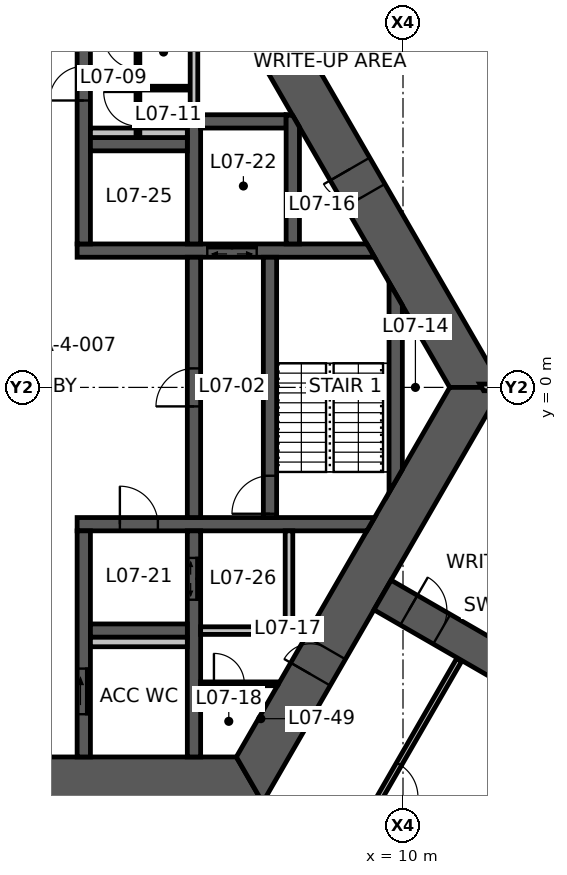
"""IFC4 building model, lengths in metres.
Left out: names, types, materials, properties, quantities, classifications, styles, units other than length and angle.
Written with IfcOpenShell. Run it as: python <this file> out.ifc"""

import sys

from ifc_helpers import new_model, si_unit, direction, frame, frame_2d, origin, place, context, subcontext, project, spatial, polyline, rectangle, outline, extrude, element, fill, save


model = new_model("IFC4")
c1 = context("Model", 3, precision=1e-05, world=origin(), true_north=direction((0.0, 1.0)))
c2 = subcontext(c1, "Body", "Model", "MODEL_VIEW")
j1 = project(units=[si_unit("LENGTHUNIT", "METRE"), si_unit("PLANEANGLEUNIT", "RADIAN")], contexts=[c1])
p1 = place(None, origin())
s1 = spatial("IfcSite", under=j1, at=p1, CompositionType="ELEMENT")
p2 = place(p1, origin())
s2 = spatial("IfcBuilding", under=s1, at=p2, CompositionType="ELEMENT")
p3 = place(p2, frame((0.0, 0.0, 26.8)))
s3 = spatial("IfcBuildingStorey", under=s2, at=p3, CompositionType="ELEMENT", Elevation=26.8)
p4 = place(p3, frame((11.922, 0.0, 0.0), z_axis=(0.0, 0.0, 1.0), x_axis=(-0.500004296715, 0.866022923061, 0.0)))
e1 = element("IfcWall", 1, at=p4, inside=s3, PredefinedType="SHEAR", context=c2, shape_type="SweptSolid", body=[
    extrude(outline(polyline([(-0.346, -0.6), (5.835, -0.6), (6.635, -0.6), (12.269, -0.6), (11.576, 0.6), (6.635, 0.6), (5.835, 0.6), (0.346, 0.6), (-0.346, -0.6)])), origin(), (0.0, 0.0, 1.0), 4.2),
])
p5 = place(p4, frame((5.835, 0.0, 0.0)))
e2 = element("IfcOpeningElement", 2, at=p5, cuts=e1, PredefinedType="OPENING", context=c2, shape_type="SweptSolid", body=[
    extrude(rectangle(XDim=0.8, YDim=2.1, at=frame_2d((0.4, 1.05))), frame((0.0, 0.61, 0.0), z_axis=(0.0, -1.0, 0.0), x_axis=(1.0, 0.0, 0.0)), (0.0, 0.0, 1.0), 1.22),
])
p6 = place(p3, frame((-5.961, -10.325, 0.0), z_axis=(0.0, 0.0, 1.0), x_axis=(1.0, 0.0, 0.0)))
e3 = element("IfcWall", 3, at=p6, inside=s3, PredefinedType="SHEAR", context=c2, shape_type="SweptSolid", body=[
    extrude(outline(polyline([(-0.346, -0.6), (5.461, -0.6), (6.461, -0.6), (12.269, -0.6), (11.576, 0.6), (6.461, 0.6), (5.461, 0.6), (0.346, 0.6), (-0.346, -0.6)])), origin(), (0.0, 0.0, 1.0), 4.2),
])
p7 = place(p6, frame((5.461, 0.0, 0.0)))
e4 = element("IfcOpeningElement", 4, at=p7, cuts=e3, PredefinedType="OPENING", context=c2, shape_type="SweptSolid", body=[
    extrude(rectangle(XDim=1.0, YDim=2.1, at=frame_2d((0.5, 1.05))), frame((0.0, 0.61, 0.0), z_axis=(0.0, -1.0, 0.0), x_axis=(1.0, 0.0, 0.0)), (0.0, 0.0, 1.0), 1.22),
])
p8 = place(p3, frame((5.961, -10.325, 0.0), z_axis=(0.0, 0.0, 1.0), x_axis=(0.500004296715, 0.866022923061, 0.0)))
e5 = element("IfcWall", 5, at=p8, inside=s3, PredefinedType="SHEAR", context=c2, shape_type="SweptSolid", body=[
    extrude(outline(polyline([(-0.346, -0.6), (3.208, -0.6), (4.009, -0.6), (12.269, -0.6), (11.576, 0.6), (4.009, 0.6), (3.208, 0.6), (0.346, 0.6), (-0.346, -0.6)])), origin(), (0.0, 0.0, 1.0), 4.2),
])
p9 = place(p8, frame((3.208, 0.0, 0.0)))
e6 = element("IfcOpeningElement", 6, at=p9, cuts=e5, PredefinedType="OPENING", context=c2, shape_type="SweptSolid", body=[
    extrude(rectangle(XDim=0.8, YDim=2.1, at=frame_2d((0.4, 1.05))), frame((0.0, 0.61, 0.0), z_axis=(0.0, -1.0, 0.0), x_axis=(1.0, 0.0, 0.0)), (0.0, 0.0, 1.0), 1.22),
])
p10 = place(p3, frame((9.461, -5.462, 0.0), z_axis=(0.0, 0.0, 1.0), x_axis=(0.866019116917, -0.500010889016, 0.0)))
e7 = element("IfcWall", 7, at=p10, inside=s3, PredefinedType="SHEAR", context=c2, shape_type="SweptSolid", body=[
    extrude(rectangle(XDim=7.595, YDim=0.9, at=frame_2d((3.798, 0.0))), origin(), (0.0, 0.0, 1.0), 4.2),
])
p11 = place(p10, frame((0.8, 0.0, 0.0)))
e8 = element("IfcOpeningElement", 8, at=p11, cuts=e7, PredefinedType="OPENING", context=c2, shape_type="SweptSolid", body=[
    extrude(rectangle(XDim=1.0, YDim=2.1, at=frame_2d((0.5, 1.05))), frame((0.0, 0.46, 0.0), z_axis=(0.0, -1.0, 0.0), x_axis=(1.0, 0.0, 0.0)), (0.0, 0.0, 1.0), 0.92),
])
p12 = place(p3, frame((1.425, 3.6, 0.0), z_axis=(0.0, 0.0, 1.0), x_axis=(1.0, 0.0, 0.0)))
e9 = element("IfcWall", 9, at=p12, inside=s3, PredefinedType="SHEAR", context=c2, shape_type="SweptSolid", body=[
    extrude(outline(polyline([(0.0, -0.175), (3.425, -0.175), (4.725, -0.175), (7.827, -0.175), (7.625, 0.175), (4.725, 0.175), (3.425, 0.175), (0.0, 0.175), (0.0, -0.175)])), origin(), (0.0, 0.0, 1.0), 4.2),
])
p13 = place(p12, frame((3.425, 0.0, 0.0)))
e10 = element("IfcOpeningElement", 10, at=p13, cuts=e9, PredefinedType="OPENING", context=c2, shape_type="SweptSolid", body=[
    extrude(rectangle(XDim=1.3, YDim=2.1, at=frame_2d((0.65, 1.05))), frame((0.0, 0.185, 0.0), z_axis=(0.0, -1.0, 0.0), x_axis=(1.0, 0.0, 0.0)), (0.0, 0.0, 1.0), 0.37),
])
p14 = place(p3, frame((1.425, -3.6, 0.0), z_axis=(0.0, 0.0, 1.0), x_axis=(1.0, 0.0, 0.0)))
e11 = element("IfcWall", 11, at=p14, inside=s3, PredefinedType="SHEAR", context=c2, shape_type="SweptSolid", body=[
    extrude(outline(polyline([(0.0, -0.175), (1.125, -0.175), (2.125, -0.175), (7.625, -0.175), (7.827, 0.175), (2.125, 0.175), (1.125, 0.175), (0.0, 0.175), (0.0, -0.175)])), origin(), (0.0, 0.0, 1.0), 4.2),
])
p15 = place(p14, frame((1.125, 0.0, 0.0)))
e12 = element("IfcOpeningElement", 12, at=p15, cuts=e11, PredefinedType="OPENING", context=c2, shape_type="SweptSolid", body=[
    extrude(rectangle(XDim=1.0, YDim=2.1, at=frame_2d((0.5, 1.05))), frame((0.0, 0.185, 0.0), z_axis=(0.0, -1.0, 0.0), x_axis=(1.0, 0.0, 0.0)), (0.0, 0.0, 1.0), 0.37),
])
p16 = place(p3, frame((1.6, 3.775, 0.0), z_axis=(0.0, 0.0, 1.0), x_axis=(0.0, 1.0, 0.0)))
e13 = element("IfcWall", 13, at=p16, inside=s3, PredefinedType="SHEAR", context=c2, shape_type="SweptSolid", body=[
    extrude(rectangle(XDim=5.95, YDim=0.35, at=frame_2d((2.975, 0.0))), origin(), (0.0, 0.0, 1.0), 4.2),
])
p17 = place(p16, frame((3.775, 0.0, 0.0)))
e14 = element("IfcOpeningElement", 14, at=p17, cuts=e13, PredefinedType="OPENING", context=c2, shape_type="SweptSolid", body=[
    extrude(rectangle(XDim=0.9, YDim=2.1, at=frame_2d((0.45, 1.05))), frame((0.0, 0.185, 0.0), z_axis=(0.0, -1.0, 0.0), x_axis=(1.0, 0.0, 0.0)), (0.0, 0.0, 1.0), 0.37),
])
p18 = place(p3, frame((1.6, -3.775, 0.0), z_axis=(0.0, 0.0, 1.0), x_axis=(0.0, -1.0, 0.0)))
e15 = element("IfcWall", 15, at=p18, inside=s3, PredefinedType="SHEAR", context=c2, shape_type="SweptSolid", body=[
    extrude(rectangle(XDim=5.95, YDim=0.35, at=frame_2d((2.975, 0.0))), origin(), (0.0, 0.0, 1.0), 4.2),
])
p19 = place(p18, frame((3.625, 0.0, 0.0)))
e16 = element("IfcOpeningElement", 16, at=p19, cuts=e15, PredefinedType="OPENING", context=c2, shape_type="SweptSolid", body=[
    extrude(rectangle(XDim=1.2, YDim=2.1, at=frame_2d((0.6, 1.05))), frame((0.0, 0.185, 0.0), z_axis=(0.0, -1.0, 0.0), x_axis=(1.0, 0.0, 0.0)), (0.0, 0.0, 1.0), 0.37),
])
p20 = place(p3, frame((4.5, -3.425, 0.0), z_axis=(0.0, 0.0, 1.0), x_axis=(0.0, 1.0, 0.0)))
e17 = element("IfcWall", 17, at=p20, inside=s3, PredefinedType="SHEAR", context=c2, shape_type="SweptSolid", body=[
    extrude(rectangle(XDim=6.85, YDim=0.35, at=frame_2d((3.425, 0.0))), origin(), (0.0, 0.0, 1.0), 4.2),
])
p21 = place(p20, frame((2.925, 0.0, 0.0)))
e18 = element("IfcOpeningElement", 18, at=p21, cuts=e17, PredefinedType="OPENING", context=c2, shape_type="SweptSolid", body=[
    extrude(rectangle(XDim=1.0, YDim=2.1, at=frame_2d((0.5, 1.05))), frame((0.0, 0.185, 0.0), z_axis=(0.0, -1.0, 0.0), x_axis=(1.0, 0.0, 0.0)), (0.0, 0.0, 1.0), 0.37),
])
p22 = place(p3, frame((6.5, -3.425, 0.0), z_axis=(0.0, 0.0, 1.0), x_axis=(0.0, 1.0, 0.0)))
e19 = element("IfcWall", 19, at=p22, inside=s3, PredefinedType="SHEAR", context=c2, shape_type="SweptSolid", body=[
    extrude(rectangle(XDim=6.85, YDim=0.35, at=frame_2d((3.425, 0.0))), origin(), (0.0, 0.0, 1.0), 4.2),
])
p23 = place(p22, frame((0.1, 0.0, 0.0)))
e20 = element("IfcOpeningElement", 20, at=p23, cuts=e19, PredefinedType="OPENING", context=c2, shape_type="SweptSolid", body=[
    extrude(rectangle(XDim=1.0, YDim=2.1, at=frame_2d((0.5, 1.05))), frame((0.0, 0.185, 0.0), z_axis=(0.0, -1.0, 0.0), x_axis=(1.0, 0.0, 0.0)), (0.0, 0.0, 1.0), 0.37),
])
p24 = place(p3, frame((4.5, 3.775, 0.0), z_axis=(0.0, 0.0, 1.0), x_axis=(0.0, 1.0, 0.0)))
e21 = element("IfcWall", 21, at=p24, inside=s3, PredefinedType="SHEAR", context=c2, shape_type="SweptSolid", body=[
    extrude(rectangle(XDim=3.4, YDim=0.35, at=frame_2d((1.7, 0.0))), origin(), (0.0, 0.0, 1.0), 4.2),
])
p25 = place(p3, frame((4.5, -3.775, 0.0), z_axis=(0.0, 0.0, 1.0), x_axis=(0.0, -1.0, 0.0)))
e22 = element("IfcWall", 22, at=p25, inside=s3, PredefinedType="SHEAR", context=c2, shape_type="SweptSolid", body=[
    extrude(rectangle(XDim=5.95, YDim=0.35, at=frame_2d((2.975, 0.0))), origin(), (0.0, 0.0, 1.0), 4.2),
])
p26 = place(p25, frame((0.712, 0.0, 0.0)))
e23 = element("IfcOpeningElement", 23, at=p26, cuts=e22, PredefinedType="OPENING", context=c2, shape_type="SweptSolid", body=[
    extrude(rectangle(XDim=1.1, YDim=2.1, at=frame_2d((0.55, 1.05))), frame((0.0, 0.185, 0.0), z_axis=(0.0, -1.0, 0.0), x_axis=(1.0, 0.0, 0.0)), (0.0, 0.0, 1.0), 0.37),
])
for number, where, z_axis, x_axis in (
    (24, (1.775, 6.4, 0.0), (0.0, 0.0, 1.0), (1.0, 0.0, 0.0)),
    (25, (1.775, -6.4, 0.0), (0.0, 0.0, 1.0), (1.0, 0.0, 0.0)),
):
    element("IfcWall", number, at=place(p3, frame(where, z_axis=z_axis, x_axis=x_axis)), inside=s3, PredefinedType="SHEAR", context=c2, shape_type="SweptSolid", body=[
        extrude(rectangle(XDim=2.55, YDim=0.35, at=frame_2d((1.275, 0.0))), origin(), (0.0, 0.0, 1.0), 4.2),
    ])
p27 = place(p3, frame((4.675, 7.0, 0.0), z_axis=(0.0, 0.0, 1.0), x_axis=(1.0, 0.0, 0.0)))
e26 = element("IfcWall", 26, at=p27, inside=s3, PredefinedType="SHEAR", context=c2, shape_type="SweptSolid", body=[
    extrude(rectangle(XDim=2.25, YDim=0.35, at=frame_2d((1.125, 0.0))), origin(), (0.0, 0.0, 1.0), 4.2),
])
p28 = place(p3, frame((7.1, 3.775, 0.0), z_axis=(0.0, 0.0, 1.0), x_axis=(0.0, 1.0, 0.0)))
e27 = element("IfcWall", 27, at=p28, inside=s3, PredefinedType="SHEAR", context=c2, shape_type="SweptSolid", body=[
    extrude(outline(polyline([(0.0, -0.175), (3.074, -0.175), (3.377, 0.0), (3.4, 0.175), (0.0, 0.175), (0.0, -0.175)])), origin(), (0.0, 0.0, 1.0), 4.2),
])
p29 = place(p3, frame((9.808, -2.462, 0.0), z_axis=(0.0, 0.0, 1.0), x_axis=(0.0, 1.0, 0.0)))
e28 = element("IfcWall", 28, at=p29, inside=s3, PredefinedType="SHEAR", context=c2, shape_type="SweptSolid", body=[
    extrude(outline(polyline([(0.303, -0.175), (4.621, -0.175), (5.228, 0.175), (-0.303, 0.175), (0.303, -0.175)])), origin(), (0.0, 0.0, 1.0), 4.2),
])
p30 = place(p3, frame((4.5, 7.175, 0.0), z_axis=(0.0, 0.0, 1.0), x_axis=(0.0, 1.0, 0.0)))
e29 = element("IfcWall", 29, at=p30, inside=s3, PredefinedType="STANDARD", context=c2, shape_type="SweptSolid", body=[
    extrude(rectangle(XDim=2.55, YDim=0.2, at=frame_2d((1.275, 0.0))), origin(), (0.0, 0.0, 1.0), 4.2),
])
p31 = place(p3, frame((4.675, -6.4, 0.0), z_axis=(0.0, 0.0, 1.0), x_axis=(1.0, 0.0, 0.0)))
e30 = element("IfcWall", 30, at=p31, inside=s3, PredefinedType="STANDARD", context=c2, shape_type="SweptSolid", body=[
    extrude(rectangle(XDim=2.425, YDim=0.2, at=frame_2d((1.212, 0.0))), origin(), (0.0, 0.0, 1.0), 4.2),
])
p32 = place(p3, frame((7.0, -3.775, 0.0), z_axis=(0.0, 0.0, 1.0), x_axis=(0.0, -1.0, 0.0)))
e31 = element("IfcWall", 31, at=p32, inside=s3, PredefinedType="STANDARD", context=c2, shape_type="SweptSolid", body=[
    extrude(rectangle(XDim=2.525, YDim=0.2, at=frame_2d((1.263, 0.0))), origin(), (0.0, 0.0, 1.0), 4.2),
])
for number, where, z_axis, x_axis in (
    (32, (1.775, 6.7, 0.0), (0.0, 0.0, 1.0), (1.0, 0.0, 0.0)),
    (33, (1.775, -6.7, 0.0), (0.0, 0.0, 1.0), (1.0, 0.0, 0.0)),
):
    element("IfcWall", number, at=place(p3, frame(where, z_axis=z_axis, x_axis=x_axis)), inside=s3, PredefinedType="PLUMBINGWALL", context=c2, shape_type="SweptSolid", body=[
        extrude(rectangle(XDim=2.55, YDim=0.25, at=frame_2d((1.275, 0.0))), origin(), (0.0, 0.0, 1.0), 4.2),
    ])
p33 = place(p3, frame((3.025, 6.575, 0.0), z_axis=(0.0, 0.0, 1.0), x_axis=(0.0, 1.0, 0.0)))
e34 = element("IfcWall", 34, at=p33, inside=s3, PredefinedType="PARTITIONING", context=c2, shape_type="SweptSolid", body=[
    extrude(rectangle(XDim=3.15, YDim=0.1, at=frame_2d((1.575, 0.0))), origin(), (0.0, 0.0, 1.0), 3.23),
])
p34 = place(p33, frame((1.8, 0.0, 0.0)))
e35 = element("IfcOpeningElement", 35, at=p34, cuts=e34, PredefinedType="OPENING", context=c2, shape_type="SweptSolid", body=[
    extrude(rectangle(XDim=0.9, YDim=2.1, at=frame_2d((0.45, 1.05))), frame((0.0, 0.06, 0.0), z_axis=(0.0, -1.0, 0.0), x_axis=(1.0, 0.0, 0.0)), (0.0, 0.0, 1.0), 0.12),
])
p35 = place(p33, frame((0.3, 0.0, 0.0)))
e36 = element("IfcOpeningElement", 36, at=p35, cuts=e34, PredefinedType="OPENING", context=c2, shape_type="SweptSolid", body=[
    extrude(rectangle(XDim=0.9, YDim=2.1, at=frame_2d((0.45, 1.05))), frame((0.0, 0.06, 0.0), z_axis=(0.0, -1.0, 0.0), x_axis=(1.0, 0.0, 0.0)), (0.0, 0.0, 1.0), 0.12),
])
p36 = place(p3, frame((3.075, 7.875, 0.0), z_axis=(0.0, 0.0, 1.0), x_axis=(1.0, 0.0, 0.0)))
e37 = element("IfcWall", 37, at=p36, inside=s3, PredefinedType="PARTITIONING", context=c2, shape_type="SweptSolid", body=[
    extrude(rectangle(XDim=1.25, YDim=0.1, at=frame_2d((0.625, 0.0))), origin(), (0.0, 0.0, 1.0), 3.23),
])
p37 = place(p3, frame((4.675, -7.8, 0.0), z_axis=(0.0, 0.0, 1.0), x_axis=(1.0, 0.0, 0.0)))
e38 = element("IfcWall", 38, at=p37, inside=s3, PredefinedType="PARTITIONING", context=c2, shape_type="SweptSolid", body=[
    extrude(outline(polyline([(0.0, -0.05), (0.35, -0.05), (1.15, -0.05), (2.022, -0.05), (2.051, 0.0), (2.057, 0.05), (1.15, 0.05), (0.35, 0.05), (0.0, 0.05), (0.0, -0.05)])), origin(), (0.0, 0.0, 1.0), 3.23),
])
p38 = place(p37, frame((0.35, 0.0, 0.0)))
e39 = element("IfcOpeningElement", 39, at=p38, cuts=e38, PredefinedType="OPENING", context=c2, shape_type="SweptSolid", body=[
    extrude(rectangle(XDim=0.8, YDim=2.1, at=frame_2d((0.4, 1.05))), frame((0.0, 0.06, 0.0), z_axis=(0.0, -1.0, 0.0), x_axis=(1.0, 0.0, 0.0)), (0.0, 0.0, 1.0), 0.12),
])
p39 = place(p3, frame((12.07, 0.0, 0.0), z_axis=(0.0, 0.0, 1.0), x_axis=(1.0, 0.0, 0.0)))
e40 = element("IfcWall", 40, at=p39, inside=s3, PredefinedType="PARTITIONING", context=c2, shape_type="SweptSolid", body=[
    extrude(outline(polyline([(0.051, -0.087), (1.129, -0.087), (2.129, -0.087), (7.93, -0.087), (7.93, 0.087), (2.129, 0.087), (1.129, 0.087), (-0.051, 0.087), (0.051, -0.087)])), origin(), (0.0, 0.0, 1.0), 3.33),
])
p40 = place(p39, frame((1.129, 0.0, 0.0)))
e41 = element("IfcOpeningElement", 41, at=p40, cuts=e40, PredefinedType="OPENING", context=c2, shape_type="SweptSolid", body=[
    extrude(rectangle(XDim=1.0, YDim=2.1, at=frame_2d((0.5, 1.05))), frame((0.0, 0.098, 0.0), z_axis=(0.0, -1.0, 0.0), x_axis=(1.0, 0.0, 0.0)), (0.0, 0.0, 1.0), 0.195),
])
p41 = place(p3, frame((14.775, -9.05, 0.0), z_axis=(0.0, 0.0, 1.0), x_axis=(-0.499993908199, -0.866028920859, 0.0)))
e42 = element("IfcWall", 42, at=p41, inside=s3, PredefinedType="PARTITIONING", context=c2, shape_type="SweptSolid", body=[
    extrude(rectangle(XDim=9.55, YDim=0.175, at=frame_2d((4.775, 0.0))), origin(), (0.0, 0.0, 1.0), 3.238),
])
p42 = place(p41, frame((4.175, 0.0, 0.0)))
e43 = element("IfcOpeningElement", 43, at=p42, cuts=e42, PredefinedType="OPENING", context=c2, shape_type="SweptSolid", body=[
    extrude(rectangle(XDim=1.2, YDim=2.1, at=frame_2d((0.6, 1.05))), frame((0.0, 0.098, 0.0), z_axis=(0.0, -1.0, 0.0), x_axis=(1.0, 0.0, 0.0)), (0.0, 0.0, 1.0), 0.195),
])
p43 = place(p3, frame((11.478, -7.169, 0.0), z_axis=(0.0, 0.0, 1.0), x_axis=(-0.500010424145, -0.866019385318, 0.0)))
e44 = element("IfcWall", 44, at=p43, inside=s3, PredefinedType="PARTITIONING", context=c2, shape_type="SweptSolid", body=[
    extrude(rectangle(XDim=7.339, YDim=0.15, at=frame_2d((3.669, 0.0))), origin(), (0.0, 0.0, 1.0), 3.23),
])
p44 = place(p43, frame((3.169, 0.0, 0.0)))
e45 = element("IfcOpeningElement", 45, at=p44, cuts=e44, PredefinedType="OPENING", context=c2, shape_type="SweptSolid", body=[
    extrude(rectangle(XDim=1.0, YDim=2.1, at=frame_2d((0.5, 1.05))), frame((0.0, 0.085, 0.0), z_axis=(0.0, -1.0, 0.0), x_axis=(1.0, 0.0, 0.0)), (0.0, 0.0, 1.0), 0.17),
])
p45 = place(p5, origin())
e46 = element("IfcDoor", 46, at=p45, inside=s3, OperationType="SINGLE_SWING_RIGHT", PredefinedType="DOOR", context=c2, shape_type="SweptSolid", body=[
    extrude(rectangle(XDim=0.8, YDim=2.1, at=frame_2d((0.4, 1.05))), frame((0.0, 0.025, 0.0), z_axis=(0.0, -1.0, 0.0), x_axis=(1.0, 0.0, 0.0)), (0.0, 0.0, 1.0), 0.05),
])
fill(e2, e46)
p46 = place(p9, origin())
e47 = element("IfcDoor", 47, at=p46, inside=s3, OperationType="SINGLE_SWING_LEFT", PredefinedType="DOOR", context=c2, shape_type="SweptSolid", body=[
    extrude(rectangle(XDim=0.8, YDim=2.1, at=frame_2d((0.4, 1.05))), frame((0.0, 0.025, 0.0), z_axis=(0.0, -1.0, 0.0), x_axis=(1.0, 0.0, 0.0)), (0.0, 0.0, 1.0), 0.05),
])
fill(e6, e47)
p47 = place(p21, origin())
e48 = element("IfcDoor", 48, at=p47, inside=s3, OperationType="SINGLE_SWING_LEFT", PredefinedType="DOOR", context=c2, shape_type="SweptSolid", body=[
    extrude(rectangle(XDim=1.0, YDim=2.1, at=frame_2d((0.5, 1.05))), frame((0.0, 0.025, 0.0), z_axis=(0.0, -1.0, 0.0), x_axis=(1.0, 0.0, 0.0)), (0.0, 0.0, 1.0), 0.05),
])
fill(e18, e48)
p48 = place(p23, origin())
e49 = element("IfcDoor", 49, at=p48, inside=s3, OperationType="SINGLE_SWING_LEFT", PredefinedType="DOOR", context=c2, shape_type="SweptSolid", body=[
    extrude(rectangle(XDim=1.0, YDim=2.1, at=frame_2d((0.5, 1.05))), frame((0.0, 0.025, 0.0), z_axis=(0.0, -1.0, 0.0), x_axis=(1.0, 0.0, 0.0)), (0.0, 0.0, 1.0), 0.05),
])
fill(e20, e49)
p49 = place(p17, origin())
e50 = element("IfcDoor", 50, at=p49, inside=s3, OperationType="SINGLE_SWING_LEFT", PredefinedType="DOOR", context=c2, shape_type="SweptSolid", body=[
    extrude(rectangle(XDim=0.9, YDim=2.1, at=frame_2d((0.45, 1.05))), frame((0.0, 0.025, 0.0), z_axis=(0.0, -1.0, 0.0), x_axis=(1.0, 0.0, 0.0)), (0.0, 0.0, 1.0), 0.05),
])
fill(e14, e50)
p50 = place(p19, origin())
e51 = element("IfcDoor", 51, at=p50, inside=s3, OperationType="SLIDING_TO_LEFT", PredefinedType="DOOR", context=c2, shape_type="SweptSolid", body=[
    extrude(rectangle(XDim=1.2, YDim=2.1, at=frame_2d((0.6, 1.05))), frame((0.0, 0.025, 0.0), z_axis=(0.0, -1.0, 0.0), x_axis=(1.0, 0.0, 0.0)), (0.0, 0.0, 1.0), 0.05),
])
fill(e16, e51)
p51 = place(p15, origin())
e52 = element("IfcDoor", 52, at=p51, inside=s3, OperationType="SINGLE_SWING_LEFT", PredefinedType="DOOR", context=c2, shape_type="SweptSolid", body=[
    extrude(rectangle(XDim=1.0, YDim=2.1, at=frame_2d((0.5, 1.05))), frame((0.0, 0.025, 0.0), z_axis=(0.0, -1.0, 0.0), x_axis=(1.0, 0.0, 0.0)), (0.0, 0.0, 1.0), 0.05),
])
fill(e12, e52)
p52 = place(p11, origin())
e53 = element("IfcDoor", 53, at=p52, inside=s3, OperationType="SINGLE_SWING_LEFT", PredefinedType="DOOR", context=c2, shape_type="SweptSolid", body=[
    extrude(rectangle(XDim=1.0, YDim=2.1, at=frame_2d((0.5, 1.05))), frame((0.0, 0.025, 0.0), z_axis=(0.0, -1.0, 0.0), x_axis=(1.0, 0.0, 0.0)), (0.0, 0.0, 1.0), 0.05),
])
fill(e8, e53)
p53 = place(p34, origin())
e54 = element("IfcDoor", 54, at=p53, inside=s3, OperationType="SINGLE_SWING_RIGHT", PredefinedType="DOOR", context=c2, shape_type="SweptSolid", body=[
    extrude(rectangle(XDim=0.9, YDim=2.1, at=frame_2d((0.45, 1.05))), frame((0.0, 0.025, 0.0), z_axis=(0.0, -1.0, 0.0), x_axis=(1.0, 0.0, 0.0)), (0.0, 0.0, 1.0), 0.05),
])
fill(e35, e54)
p54 = place(p35, origin())
e55 = element("IfcDoor", 55, at=p54, inside=s3, OperationType="SINGLE_SWING_RIGHT", PredefinedType="DOOR", context=c2, shape_type="SweptSolid", body=[
    extrude(rectangle(XDim=0.9, YDim=2.1, at=frame_2d((0.45, 1.05))), frame((0.0, 0.025, 0.0), z_axis=(0.0, -1.0, 0.0), x_axis=(1.0, 0.0, 0.0)), (0.0, 0.0, 1.0), 0.05),
])
fill(e36, e55)
p55 = place(p38, origin())
e56 = element("IfcDoor", 56, at=p55, inside=s3, OperationType="SINGLE_SWING_LEFT", PredefinedType="DOOR", context=c2, shape_type="SweptSolid", body=[
    extrude(rectangle(XDim=0.8, YDim=2.1, at=frame_2d((0.4, 1.05))), frame((0.0, 0.025, 0.0), z_axis=(0.0, -1.0, 0.0), x_axis=(1.0, 0.0, 0.0)), (0.0, 0.0, 1.0), 0.05),
])
fill(e39, e56)
p56 = place(p44, origin())
e57 = element("IfcDoor", 57, at=p56, inside=s3, OperationType="SINGLE_SWING_RIGHT", PredefinedType="DOOR", context=c2, shape_type="SweptSolid", body=[
    extrude(rectangle(XDim=1.0, YDim=2.1, at=frame_2d((0.5, 1.05))), frame((0.0, 0.025, 0.0), z_axis=(0.0, -1.0, 0.0), x_axis=(1.0, 0.0, 0.0)), (0.0, 0.0, 1.0), 0.05),
])
fill(e45, e57)
p57 = place(p26, origin())
e58 = element("IfcDoor", 58, at=p57, inside=s3, OperationType="DOUBLE_DOOR_SLIDING", PredefinedType="DOOR", context=c2, shape_type="SweptSolid", body=[
    extrude(rectangle(XDim=1.1, YDim=2.1, at=frame_2d((0.55, 1.05))), frame((0.0, 0.025, 0.0), z_axis=(0.0, -1.0, 0.0), x_axis=(1.0, 0.0, 0.0)), (0.0, 0.0, 1.0), 0.05),
])
fill(e23, e58)
p58 = place(p13, origin())
e59 = element("IfcDoor", 59, at=p58, inside=s3, OperationType="DOUBLE_DOOR_SLIDING", PredefinedType="DOOR", context=c2, shape_type="SweptSolid", body=[
    extrude(rectangle(XDim=1.3, YDim=2.1, at=frame_2d((0.65, 1.05))), frame((0.0, 0.025, 0.0), z_axis=(0.0, -1.0, 0.0), x_axis=(1.0, 0.0, 0.0)), (0.0, 0.0, 1.0), 0.05),
])
fill(e10, e59)
save(model, sys.argv[1])
